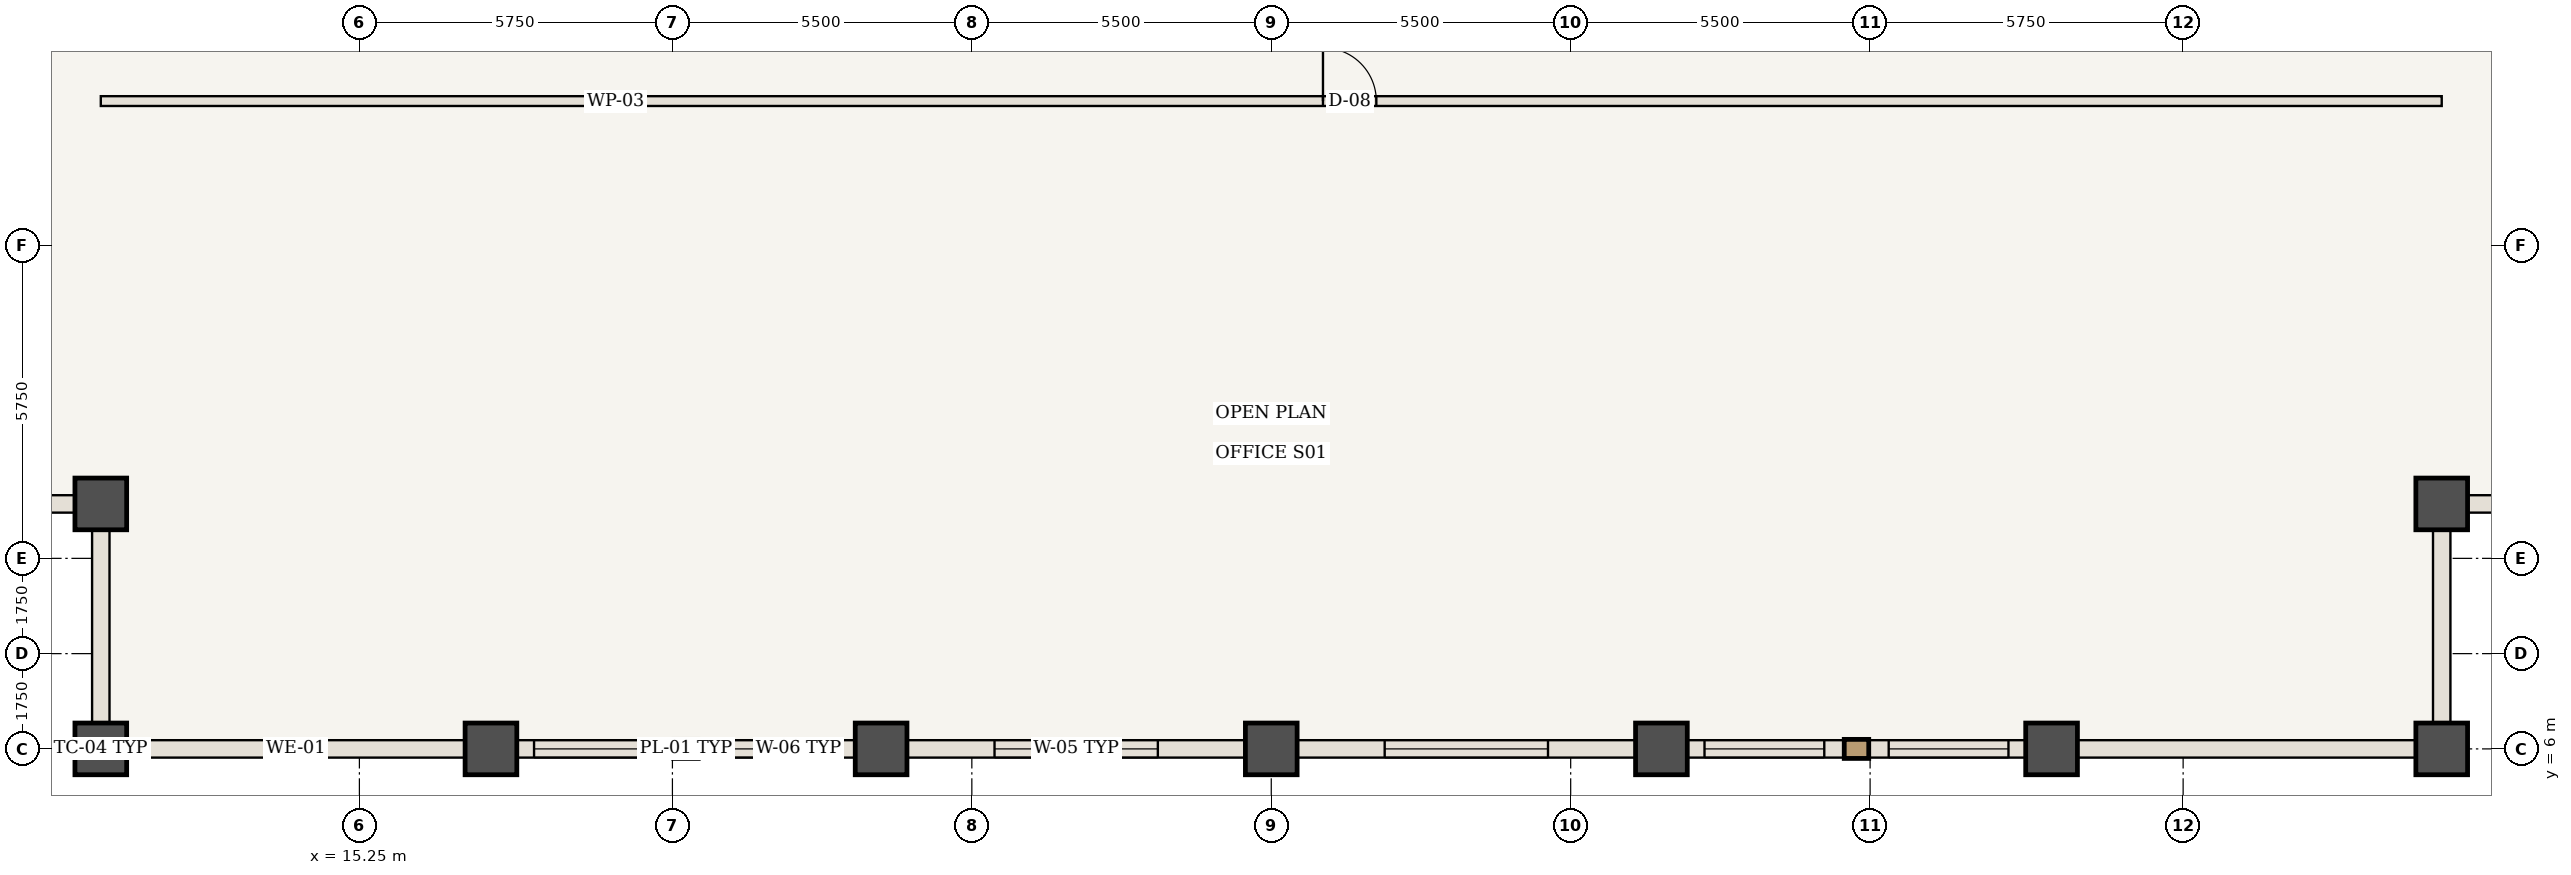
"""IFC4 building model, lengths in metres.
Left out: names, types, materials, properties, quantities, classifications, styles, units other than length and angle.
Written with IfcOpenShell. Run it as: python <this file> out.ifc"""

import sys

from ifc_helpers import new_model, si_unit, direction, frame, frame_2d, origin, origin_2d, place, context, subcontext, project, spatial, rectangle, extrude, element, fill, save


model = new_model("IFC4")
c1 = context("Model", 3, precision=1e-05, world=origin(), true_north=direction((0.0, 1.0)))
c2 = subcontext(c1, "Body", "Model", "MODEL_VIEW")
j1 = project(units=[si_unit("LENGTHUNIT", "METRE"), si_unit("PLANEANGLEUNIT", "RADIAN")], contexts=[c1])
p1 = place(None, origin())
s1 = spatial("IfcSite", under=j1, at=p1, CompositionType="ELEMENT")
p2 = place(p1, origin())
s2 = spatial("IfcBuilding", under=s1, at=p2, CompositionType="ELEMENT")
p3 = place(p2, frame((0.0, 0.0, 149.1)))
s3 = spatial("IfcBuildingStorey", under=s2, at=p3, CompositionType="ELEMENT", Elevation=149.1)
for number, where, z_axis, x_axis in (
    (1, (10.5, 6.0, 0.0), (0.0, 0.0, 1.0), (1.0, 0.0, 0.0)),
    (2, (10.5, 10.5, 0.0), (0.0, 0.0, 1.0), (1.0, 0.0, 0.0)),
    (3, (53.5, 6.0, 0.0), (0.0, 0.0, 1.0), (1.0, 0.0, 0.0)),
    (4, (53.5, 10.5, 0.0), (0.0, 0.0, 1.0), (1.0, 0.0, 0.0)),
    (5, (17.667, 6.0, 0.0), (0.0, 0.0, 1.0), (1.0, 0.0, 0.0)),
    (6, (24.833, 6.0, 0.0), (0.0, 0.0, 1.0), (1.0, 0.0, 0.0)),
    (7, (32.0, 6.0, 0.0), (0.0, 0.0, 1.0), (1.0, 0.0, 0.0)),
    (8, (39.167, 6.0, 0.0), (0.0, 0.0, 1.0), (1.0, 0.0, 0.0)),
    (9, (46.333, 6.0, 0.0), (0.0, 0.0, 1.0), (1.0, 0.0, 0.0)),
):
    element("IfcColumn", number, at=place(p3, frame(where, z_axis=z_axis, x_axis=x_axis)), inside=s3, PredefinedType="COLUMN", context=c2, shape_type="SweptSolid", body=[
        extrude(rectangle(XDim=0.95, YDim=0.95, at=origin_2d()), origin(), (0.0, 0.0, 1.0), 3.85),
    ])
p4 = place(p3, frame((10.5, 17.9, 0.0), z_axis=(0.0, 0.0, 1.0), x_axis=(1.0, 0.0, 0.0)))
e10 = element("IfcWall", 10, at=p4, inside=s3, PredefinedType="STANDARD", context=c2, shape_type="SweptSolid", body=[
    extrude(rectangle(XDim=43.0, YDim=0.18, at=frame_2d((21.5, 0.0))), origin(), (0.0, 0.0, 1.0), 3.685),
])
p5 = place(p4, frame((22.45, 0.0, 0.0)))
e11 = element("IfcOpeningElement", 11, at=p5, cuts=e10, PredefinedType="OPENING", context=c2, shape_type="SweptSolid", body=[
    extrude(rectangle(XDim=0.98, YDim=2.2, at=frame_2d((0.49, 1.1))), frame((0.0, 0.1, 0.0), z_axis=(0.0, -1.0, 0.0), x_axis=(1.0, 0.0, 0.0)), (0.0, 0.0, 1.0), 0.2),
])
p6 = place(p3, frame((17.667, 6.0, 0.0), z_axis=(0.0, 0.0, 1.0), x_axis=(-1.0, 0.0, 0.0)))
e12 = element("IfcWall", 12, at=p6, inside=s3, PredefinedType="USERDEFINED", context=c2, shape_type="SweptSolid", body=[
    extrude(rectangle(XDim=7.167, YDim=0.32, at=frame_2d((3.583, 0.0))), origin(), (0.0, 0.0, 1.0), 2.885),
])
p7 = place(p3, frame((24.833, 6.0, 0.0), z_axis=(0.0, 0.0, 1.0), x_axis=(-1.0, 0.0, 0.0)))
e13 = element("IfcWall", 13, at=p7, inside=s3, PredefinedType="USERDEFINED", context=c2, shape_type="SweptSolid", body=[
    extrude(rectangle(XDim=7.167, YDim=0.32, at=frame_2d((3.583, 0.0))), origin(), (0.0, 0.0, 1.0), 2.885),
])
p8 = place(p7, frame((0.792, 0.0, 0.85)))
e14 = element("IfcOpeningElement", 14, at=p8, cuts=e13, PredefinedType="OPENING", context=c2, shape_type="SweptSolid", body=[
    extrude(rectangle(XDim=2.2, YDim=1.835, at=frame_2d((1.1, 0.917))), frame((0.0, 0.17, 0.0), z_axis=(0.0, -1.0, 0.0), x_axis=(1.0, 0.0, 0.0)), (0.0, 0.0, 1.0), 0.34),
])
p9 = place(p7, frame((4.175, 0.0, 0.85)))
e15 = element("IfcOpeningElement", 15, at=p9, cuts=e13, PredefinedType="OPENING", context=c2, shape_type="SweptSolid", body=[
    extrude(rectangle(XDim=2.2, YDim=1.835, at=frame_2d((1.1, 0.917))), frame((0.0, 0.17, 0.0), z_axis=(0.0, -1.0, 0.0), x_axis=(1.0, 0.0, 0.0)), (0.0, 0.0, 1.0), 0.34),
])
p10 = place(p3, frame((32.0, 6.0, 0.0), z_axis=(0.0, 0.0, 1.0), x_axis=(-1.0, 0.0, 0.0)))
e16 = element("IfcWall", 16, at=p10, inside=s3, PredefinedType="USERDEFINED", context=c2, shape_type="SweptSolid", body=[
    extrude(rectangle(XDim=7.167, YDim=0.32, at=frame_2d((3.583, 0.0))), origin(), (0.0, 0.0, 1.0), 2.885),
])
p11 = place(p10, frame((2.083, 0.0, 0.85)))
e17 = element("IfcOpeningElement", 17, at=p11, cuts=e16, PredefinedType="OPENING", context=c2, shape_type="SweptSolid", body=[
    extrude(rectangle(XDim=3.0, YDim=1.835, at=frame_2d((1.5, 0.917))), frame((0.0, 0.17, 0.0), z_axis=(0.0, -1.0, 0.0), x_axis=(1.0, 0.0, 0.0)), (0.0, 0.0, 1.0), 0.34),
])
p12 = place(p3, frame((39.167, 6.0, 0.0), z_axis=(0.0, 0.0, 1.0), x_axis=(-1.0, 0.0, 0.0)))
e18 = element("IfcWall", 18, at=p12, inside=s3, PredefinedType="USERDEFINED", context=c2, shape_type="SweptSolid", body=[
    extrude(rectangle(XDim=7.167, YDim=0.32, at=frame_2d((3.583, 0.0))), origin(), (0.0, 0.0, 1.0), 2.885),
])
p13 = place(p12, frame((2.083, 0.0, 0.85)))
e19 = element("IfcOpeningElement", 19, at=p13, cuts=e18, PredefinedType="OPENING", context=c2, shape_type="SweptSolid", body=[
    extrude(rectangle(XDim=3.0, YDim=1.835, at=frame_2d((1.5, 0.917))), frame((0.0, 0.17, 0.0), z_axis=(0.0, -1.0, 0.0), x_axis=(1.0, 0.0, 0.0)), (0.0, 0.0, 1.0), 0.34),
])
p14 = place(p3, frame((46.333, 6.0, 0.0), z_axis=(0.0, 0.0, 1.0), x_axis=(-1.0, 0.0, 0.0)))
e20 = element("IfcWall", 20, at=p14, inside=s3, PredefinedType="USERDEFINED", context=c2, shape_type="SweptSolid", body=[
    extrude(rectangle(XDim=7.167, YDim=0.32, at=frame_2d((3.583, 0.0))), origin(), (0.0, 0.0, 1.0), 2.885),
])
p15 = place(p14, frame((0.792, 0.0, 0.85)))
e21 = element("IfcOpeningElement", 21, at=p15, cuts=e20, PredefinedType="OPENING", context=c2, shape_type="SweptSolid", body=[
    extrude(rectangle(XDim=2.2, YDim=1.835, at=frame_2d((1.1, 0.917))), frame((0.0, 0.17, 0.0), z_axis=(0.0, -1.0, 0.0), x_axis=(1.0, 0.0, 0.0)), (0.0, 0.0, 1.0), 0.34),
])
p16 = place(p14, frame((4.175, 0.0, 0.85)))
e22 = element("IfcOpeningElement", 22, at=p16, cuts=e20, PredefinedType="OPENING", context=c2, shape_type="SweptSolid", body=[
    extrude(rectangle(XDim=2.2, YDim=1.835, at=frame_2d((1.1, 0.917))), frame((0.0, 0.17, 0.0), z_axis=(0.0, -1.0, 0.0), x_axis=(1.0, 0.0, 0.0)), (0.0, 0.0, 1.0), 0.34),
])
p17 = place(p3, frame((53.5, 6.0, 0.0), z_axis=(0.0, 0.0, 1.0), x_axis=(-1.0, 0.0, 0.0)))
e23 = element("IfcWall", 23, at=p17, inside=s3, PredefinedType="USERDEFINED", context=c2, shape_type="SweptSolid", body=[
    extrude(rectangle(XDim=7.167, YDim=0.32, at=frame_2d((3.583, 0.0))), origin(), (0.0, 0.0, 1.0), 2.885),
])
for number, where, z_axis, x_axis in (
    (24, (10.5, 6.0, 0.0), (0.0, 0.0, 1.0), (0.0, 1.0, 0.0)),
    (25, (10.5, 10.5, 0.0), (0.0, 0.0, 1.0), (-1.0, 0.0, 0.0)),
    (26, (53.5, 10.5, 0.0), (0.0, 0.0, 1.0), (0.0, -1.0, 0.0)),
    (27, (58.0, 10.5, 0.0), (0.0, 0.0, 1.0), (-1.0, 0.0, 0.0)),
):
    element("IfcWall", number, at=place(p3, frame(where, z_axis=z_axis, x_axis=x_axis)), inside=s3, PredefinedType="USERDEFINED", context=c2, shape_type="SweptSolid", body=[
        extrude(rectangle(XDim=4.5, YDim=0.32, at=frame_2d((2.25, 0.0))), origin(), (0.0, 0.0, 1.0), 2.885),
    ])
p18 = place(p5, origin())
e28 = element("IfcDoor", 28, at=p18, inside=s3, OperationType="SINGLE_SWING_LEFT", PredefinedType="DOOR", context=c2, shape_type="SweptSolid", body=[
    extrude(rectangle(XDim=0.98, YDim=2.2, at=frame_2d((0.49, 1.1))), frame((0.0, 0.025, 0.0), z_axis=(0.0, -1.0, 0.0), x_axis=(1.0, 0.0, 0.0)), (0.0, 0.0, 1.0), 0.05),
])
fill(e11, e28)
p19 = place(p8, origin())
e29 = element("IfcWindow", 29, at=p19, inside=s3, PartitioningType="SINGLE_PANEL", PredefinedType="WINDOW", context=c2, shape_type="SweptSolid", body=[
    extrude(rectangle(XDim=2.2, YDim=1.835, at=frame_2d((1.1, 0.917))), frame((0.0, 0.03, 0.0), z_axis=(0.0, -1.0, 0.0), x_axis=(1.0, 0.0, 0.0)), (0.0, 0.0, 1.0), 0.06),
])
fill(e14, e29)
p20 = place(p9, origin())
e30 = element("IfcWindow", 30, at=p20, inside=s3, PartitioningType="SINGLE_PANEL", PredefinedType="WINDOW", context=c2, shape_type="SweptSolid", body=[
    extrude(rectangle(XDim=2.2, YDim=1.835, at=frame_2d((1.1, 0.917))), frame((0.0, 0.03, 0.0), z_axis=(0.0, -1.0, 0.0), x_axis=(1.0, 0.0, 0.0)), (0.0, 0.0, 1.0), 0.06),
])
fill(e15, e30)
p21 = place(p11, origin())
e31 = element("IfcWindow", 31, at=p21, inside=s3, PartitioningType="SINGLE_PANEL", PredefinedType="WINDOW", context=c2, shape_type="SweptSolid", body=[
    extrude(rectangle(XDim=3.0, YDim=1.835, at=frame_2d((1.5, 0.917))), frame((0.0, 0.03, 0.0), z_axis=(0.0, -1.0, 0.0), x_axis=(1.0, 0.0, 0.0)), (0.0, 0.0, 1.0), 0.06),
])
fill(e17, e31)
p22 = place(p13, origin())
e32 = element("IfcWindow", 32, at=p22, inside=s3, PartitioningType="SINGLE_PANEL", PredefinedType="WINDOW", context=c2, shape_type="SweptSolid", body=[
    extrude(rectangle(XDim=3.0, YDim=1.835, at=frame_2d((1.5, 0.917))), frame((0.0, 0.03, 0.0), z_axis=(0.0, -1.0, 0.0), x_axis=(1.0, 0.0, 0.0)), (0.0, 0.0, 1.0), 0.06),
])
fill(e19, e32)
p23 = place(p15, origin())
e33 = element("IfcWindow", 33, at=p23, inside=s3, PartitioningType="SINGLE_PANEL", PredefinedType="WINDOW", context=c2, shape_type="SweptSolid", body=[
    extrude(rectangle(XDim=2.2, YDim=1.835, at=frame_2d((1.1, 0.917))), frame((0.0, 0.03, 0.0), z_axis=(0.0, -1.0, 0.0), x_axis=(1.0, 0.0, 0.0)), (0.0, 0.0, 1.0), 0.06),
])
fill(e21, e33)
p24 = place(p16, origin())
e34 = element("IfcWindow", 34, at=p24, inside=s3, PartitioningType="SINGLE_PANEL", PredefinedType="WINDOW", context=c2, shape_type="SweptSolid", body=[
    extrude(rectangle(XDim=2.2, YDim=1.835, at=frame_2d((1.1, 0.917))), frame((0.0, 0.03, 0.0), z_axis=(0.0, -1.0, 0.0), x_axis=(1.0, 0.0, 0.0)), (0.0, 0.0, 1.0), 0.06),
])
fill(e22, e34)
save(model, sys.argv[1])
